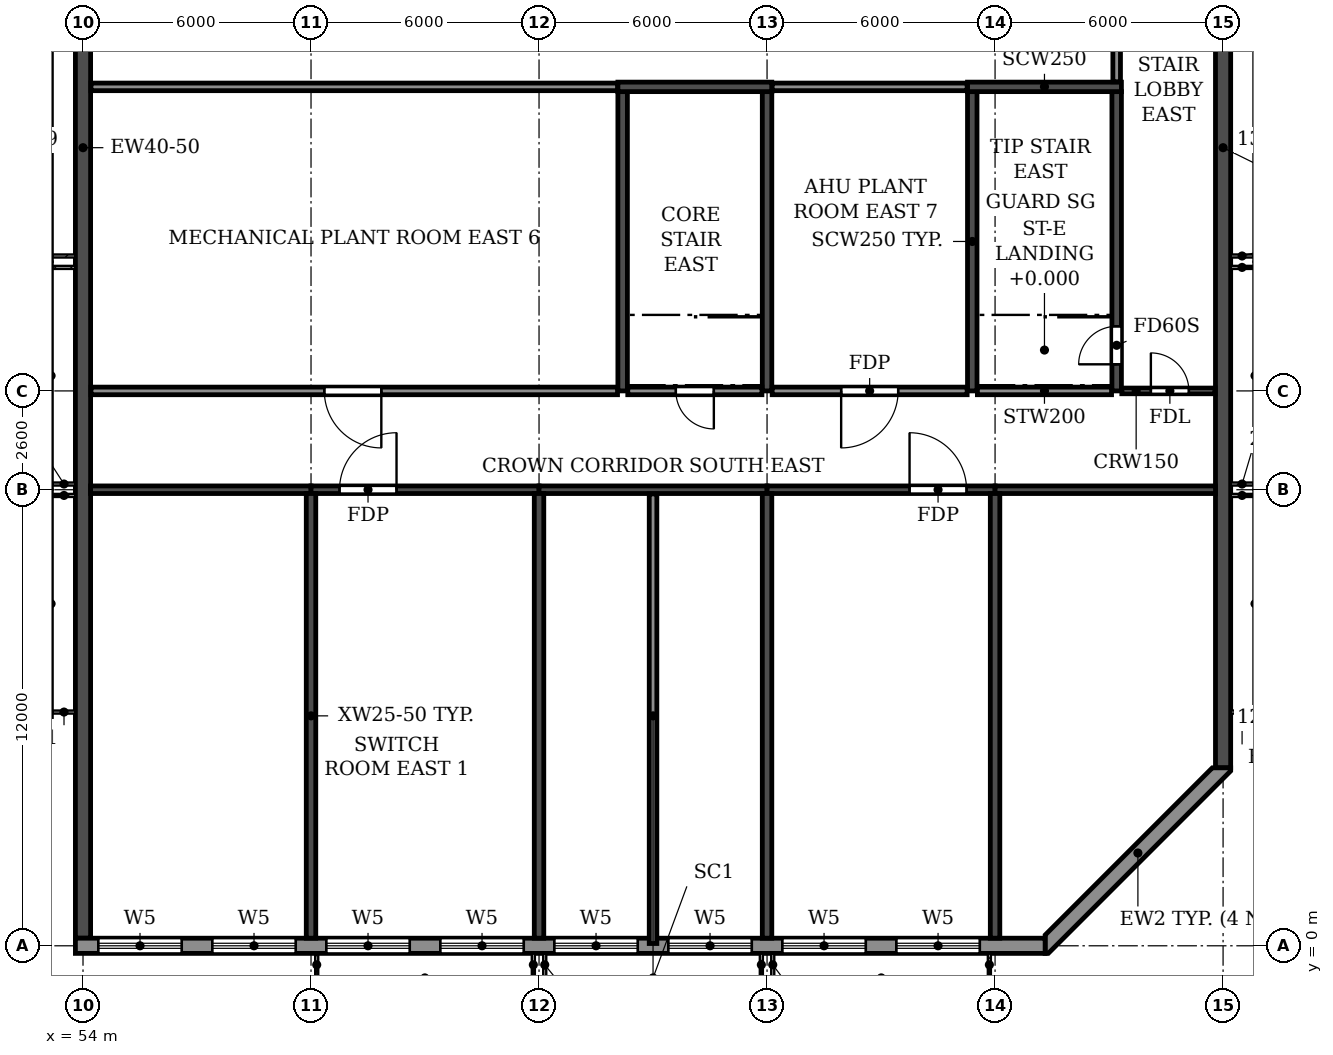
"""IFC4 building model, lengths in metres.
Left out: names, types, materials, properties, quantities, classifications, styles, units other than length and angle.
Written with IfcOpenShell. Run it as: python <this file> out.ifc"""

import sys

from ifc_helpers import new_model, si_unit, direction, frame, frame_2d, origin, place, context, subcontext, project, spatial, polyline, rectangle, outline, extrude, element, fill, save


model = new_model("IFC4")
c1 = context("Model", 3, precision=1e-05, world=origin(), true_north=direction((0.0, 1.0)))
c2 = subcontext(c1, "Body", "Model", "MODEL_VIEW")
j1 = project(units=[si_unit("LENGTHUNIT", "METRE"), si_unit("PLANEANGLEUNIT", "RADIAN")], contexts=[c1])
p1 = place(None, origin())
s1 = spatial("IfcSite", under=j1, at=p1, CompositionType="ELEMENT")
p2 = place(p1, origin())
s2 = spatial("IfcBuilding", under=s1, at=p2, CompositionType="ELEMENT")
p3 = place(p2, frame((0.0, 0.0, 282.3)))
s3 = spatial("IfcBuildingStorey", under=s2, at=p3, CompositionType="ELEMENT", Elevation=282.3)
for number, where, z_axis, x_axis in (
    (1, (60.0, 0.2, 0.0), (0.0, 0.0, 1.0), (0.0, 1.0, 0.0)),
    (2, (66.0, 0.2, 0.0), (0.0, 0.0, 1.0), (0.0, 1.0, 0.0)),
    (3, (72.0, 0.2, 0.0), (0.0, 0.0, 1.0), (0.0, 1.0, 0.0)),
    (4, (78.0, 0.2, 0.0), (0.0, 0.0, 1.0), (0.0, 1.0, 0.0)),
):
    element("IfcWall", number, at=place(p3, frame(where, z_axis=z_axis, x_axis=x_axis)), inside=s3, PredefinedType="SHEAR", context=c2, shape_type="SweptSolid", body=[
        extrude(rectangle(XDim=11.7, YDim=0.25, at=frame_2d((5.85, 0.0))), origin(), (0.0, 0.0, 1.0), 3.05),
    ])
p4 = place(p3, frame((54.0, 0.2, 0.0), z_axis=(0.0, 0.0, 1.0), x_axis=(0.0, 1.0, 0.0)))
e5 = element("IfcWall", 5, at=p4, inside=s3, PredefinedType="SHEAR", context=c2, shape_type="SweptSolid", body=[
    extrude(rectangle(XDim=40.8, YDim=0.4, at=frame_2d((20.4, 0.0))), origin(), (0.0, 0.0, 1.0), 3.05),
])
p5 = place(p3, frame((84.0, 4.683, 0.0), z_axis=(0.0, 0.0, 1.0), x_axis=(0.0, 1.0, 0.0)))
e6 = element("IfcWall", 6, at=p5, inside=s3, PredefinedType="SHEAR", context=c2, shape_type="SweptSolid", body=[
    extrude(rectangle(XDim=31.834, YDim=0.4, at=frame_2d((15.917, 0.0))), origin(), (0.0, 0.0, 1.0), 3.05),
])
p6 = place(p3, frame((54.2, 12.0, 0.0), z_axis=(0.0, 0.0, 1.0), x_axis=(1.0, 0.0, 0.0)))
e7 = element("IfcWall", 7, at=p6, inside=s3, PredefinedType="SHEAR", context=c2, shape_type="SweptSolid", body=[
    extrude(rectangle(XDim=5.8, YDim=0.2, at=frame_2d((2.9, 0.0))), origin(), (0.0, 0.0, 1.0), 2.45),
])
p7 = place(p3, frame((60.0, 12.0, 0.0), z_axis=(0.0, 0.0, 1.0), x_axis=(1.0, 0.0, 0.0)))
e8 = element("IfcWall", 8, at=p7, inside=s3, PredefinedType="SHEAR", context=c2, shape_type="SweptSolid", body=[
    extrude(rectangle(XDim=6.0, YDim=0.2, at=frame_2d((3.0, 0.0))), origin(), (0.0, 0.0, 1.0), 2.45),
])
p8 = place(p7, frame((0.75, 0.0, 0.0)))
e9 = element("IfcOpeningElement", 9, at=p8, cuts=e8, PredefinedType="OPENING", context=c2, shape_type="SweptSolid", body=[
    extrude(rectangle(XDim=1.5, YDim=2.1, at=frame_2d((0.75, 1.05))), frame((0.0, 0.11, 0.0), z_axis=(0.0, -1.0, 0.0), x_axis=(1.0, 0.0, 0.0)), (0.0, 0.0, 1.0), 0.22),
])
p9 = place(p3, frame((66.0, 12.0, 0.0), z_axis=(0.0, 0.0, 1.0), x_axis=(1.0, 0.0, 0.0)))
e10 = element("IfcWall", 10, at=p9, inside=s3, PredefinedType="SHEAR", context=c2, shape_type="SweptSolid", body=[
    extrude(rectangle(XDim=6.0, YDim=0.2, at=frame_2d((3.0, 0.0))), origin(), (0.0, 0.0, 1.0), 2.45),
])
p10 = place(p3, frame((72.0, 12.0, 0.0), z_axis=(0.0, 0.0, 1.0), x_axis=(1.0, 0.0, 0.0)))
e11 = element("IfcWall", 11, at=p10, inside=s3, PredefinedType="SHEAR", context=c2, shape_type="SweptSolid", body=[
    extrude(rectangle(XDim=6.0, YDim=0.2, at=frame_2d((3.0, 0.0))), origin(), (0.0, 0.0, 1.0), 2.45),
])
p11 = place(p10, frame((3.75, 0.0, 0.0)))
e12 = element("IfcOpeningElement", 12, at=p11, cuts=e11, PredefinedType="OPENING", context=c2, shape_type="SweptSolid", body=[
    extrude(rectangle(XDim=1.5, YDim=2.1, at=frame_2d((0.75, 1.05))), frame((0.0, 0.11, 0.0), z_axis=(0.0, -1.0, 0.0), x_axis=(1.0, 0.0, 0.0)), (0.0, 0.0, 1.0), 0.22),
])
p12 = place(p3, frame((78.0, 12.0, 0.0), z_axis=(0.0, 0.0, 1.0), x_axis=(1.0, 0.0, 0.0)))
e13 = element("IfcWall", 13, at=p12, inside=s3, PredefinedType="SHEAR", context=c2, shape_type="SweptSolid", body=[
    extrude(rectangle(XDim=5.8, YDim=0.2, at=frame_2d((2.9, 0.0))), origin(), (0.0, 0.0, 1.0), 2.45),
])
p13 = place(p3, frame((77.4, 14.6, 0.0), z_axis=(0.0, 0.0, 1.0), x_axis=(0.0, 1.0, 0.0)))
e14 = element("IfcWall", 14, at=p13, inside=s3, PredefinedType="SOLIDWALL", context=c2, shape_type="SweptSolid", body=[
    extrude(rectangle(XDim=7.875, YDim=0.25, at=frame_2d((3.938, 0.0))), origin(), (0.0, 0.0, 1.0), 3.05),
])
p14 = place(p3, frame((81.2, 14.6, 0.0), z_axis=(0.0, 0.0, 1.0), x_axis=(0.0, 1.0, 0.0)))
e15 = element("IfcWall", 15, at=p14, inside=s3, PredefinedType="SOLIDWALL", context=c2, shape_type="SweptSolid", body=[
    extrude(rectangle(XDim=7.875, YDim=0.25, at=frame_2d((3.938, 0.0))), origin(), (0.0, 0.0, 1.0), 3.05),
])
p15 = place(p14, frame((0.7, 0.0, 0.0)))
e16 = element("IfcOpeningElement", 16, at=p15, cuts=e15, PredefinedType="OPENING", context=c2, shape_type="SweptSolid", body=[
    extrude(rectangle(XDim=1.0, YDim=2.1, at=frame_2d((0.5, 1.05))), frame((0.0, 0.135, 0.0), z_axis=(0.0, -1.0, 0.0), x_axis=(1.0, 0.0, 0.0)), (0.0, 0.0, 1.0), 0.27),
])
p16 = place(p3, frame((77.275, 22.6, 0.0), z_axis=(0.0, 0.0, 1.0), x_axis=(1.0, 0.0, 0.0)))
e17 = element("IfcWall", 17, at=p16, inside=s3, PredefinedType="SOLIDWALL", context=c2, shape_type="SweptSolid", body=[
    extrude(rectangle(XDim=4.05, YDim=0.25, at=frame_2d((2.025, 0.0))), origin(), (0.0, 0.0, 1.0), 3.05),
])
for number, where, z_axis, x_axis in (
    (18, (68.2, 14.6, 0.0), (0.0, 0.0, 1.0), (0.0, 1.0, 0.0)),
    (19, (72.0, 14.6, 0.0), (0.0, 0.0, 1.0), (0.0, 1.0, 0.0)),
):
    element("IfcWall", number, at=place(p3, frame(where, z_axis=z_axis, x_axis=x_axis)), inside=s3, PredefinedType="SOLIDWALL", context=c2, shape_type="SweptSolid", body=[
        extrude(rectangle(XDim=7.875, YDim=0.25, at=frame_2d((3.938, 0.0))), origin(), (0.0, 0.0, 1.0), 3.05),
    ])
p17 = place(p3, frame((68.075, 22.6, 0.0), z_axis=(0.0, 0.0, 1.0), x_axis=(1.0, 0.0, 0.0)))
e20 = element("IfcWall", 20, at=p17, inside=s3, PredefinedType="SOLIDWALL", context=c2, shape_type="SweptSolid", body=[
    extrude(rectangle(XDim=4.05, YDim=0.25, at=frame_2d((2.025, 0.0))), origin(), (0.0, 0.0, 1.0), 3.05),
])
p18 = place(p3, frame((53.8, 0.0, 0.0), z_axis=(0.0, 0.0, 1.0), x_axis=(1.0, 0.0, 0.0)))
e21 = element("IfcWall", 21, at=p18, inside=s3, PredefinedType="STANDARD", context=c2, shape_type="SweptSolid", body=[
    extrude(rectangle(XDim=25.517, YDim=0.4, at=frame_2d((12.759, 0.0))), origin(), (0.0, 0.0, 1.0), 3.05),
])
p19 = place(p18, frame((0.6, 0.0, 0.6)))
e22 = element("IfcOpeningElement", 22, at=p19, cuts=e21, PredefinedType="OPENING", context=c2, shape_type="SweptSolid", body=[
    extrude(rectangle(XDim=2.2, YDim=2.4, at=frame_2d((1.1, 1.2))), frame((0.0, 0.21, 0.0), z_axis=(0.0, -1.0, 0.0), x_axis=(1.0, 0.0, 0.0)), (0.0, 0.0, 1.0), 0.42),
])
p20 = place(p18, frame((3.6, 0.0, 0.6)))
e23 = element("IfcOpeningElement", 23, at=p20, cuts=e21, PredefinedType="OPENING", context=c2, shape_type="SweptSolid", body=[
    extrude(rectangle(XDim=2.2, YDim=2.4, at=frame_2d((1.1, 1.2))), frame((0.0, 0.21, 0.0), z_axis=(0.0, -1.0, 0.0), x_axis=(1.0, 0.0, 0.0)), (0.0, 0.0, 1.0), 0.42),
])
p21 = place(p18, frame((6.6, 0.0, 0.6)))
e24 = element("IfcOpeningElement", 24, at=p21, cuts=e21, PredefinedType="OPENING", context=c2, shape_type="SweptSolid", body=[
    extrude(rectangle(XDim=2.2, YDim=2.4, at=frame_2d((1.1, 1.2))), frame((0.0, 0.21, 0.0), z_axis=(0.0, -1.0, 0.0), x_axis=(1.0, 0.0, 0.0)), (0.0, 0.0, 1.0), 0.42),
])
p22 = place(p18, frame((9.6, 0.0, 0.6)))
e25 = element("IfcOpeningElement", 25, at=p22, cuts=e21, PredefinedType="OPENING", context=c2, shape_type="SweptSolid", body=[
    extrude(rectangle(XDim=2.2, YDim=2.4, at=frame_2d((1.1, 1.2))), frame((0.0, 0.21, 0.0), z_axis=(0.0, -1.0, 0.0), x_axis=(1.0, 0.0, 0.0)), (0.0, 0.0, 1.0), 0.42),
])
p23 = place(p18, frame((12.6, 0.0, 0.6)))
e26 = element("IfcOpeningElement", 26, at=p23, cuts=e21, PredefinedType="OPENING", context=c2, shape_type="SweptSolid", body=[
    extrude(rectangle(XDim=2.2, YDim=2.4, at=frame_2d((1.1, 1.2))), frame((0.0, 0.21, 0.0), z_axis=(0.0, -1.0, 0.0), x_axis=(1.0, 0.0, 0.0)), (0.0, 0.0, 1.0), 0.42),
])
p24 = place(p18, frame((15.6, 0.0, 0.6)))
e27 = element("IfcOpeningElement", 27, at=p24, cuts=e21, PredefinedType="OPENING", context=c2, shape_type="SweptSolid", body=[
    extrude(rectangle(XDim=2.2, YDim=2.4, at=frame_2d((1.1, 1.2))), frame((0.0, 0.21, 0.0), z_axis=(0.0, -1.0, 0.0), x_axis=(1.0, 0.0, 0.0)), (0.0, 0.0, 1.0), 0.42),
])
p25 = place(p18, frame((18.6, 0.0, 0.6)))
e28 = element("IfcOpeningElement", 28, at=p25, cuts=e21, PredefinedType="OPENING", context=c2, shape_type="SweptSolid", body=[
    extrude(rectangle(XDim=2.2, YDim=2.4, at=frame_2d((1.1, 1.2))), frame((0.0, 0.21, 0.0), z_axis=(0.0, -1.0, 0.0), x_axis=(1.0, 0.0, 0.0)), (0.0, 0.0, 1.0), 0.42),
])
p26 = place(p18, frame((21.6, 0.0, 0.6)))
e29 = element("IfcOpeningElement", 29, at=p26, cuts=e21, PredefinedType="OPENING", context=c2, shape_type="SweptSolid", body=[
    extrude(rectangle(XDim=2.2, YDim=2.4, at=frame_2d((1.1, 1.2))), frame((0.0, 0.21, 0.0), z_axis=(0.0, -1.0, 0.0), x_axis=(1.0, 0.0, 0.0)), (0.0, 0.0, 1.0), 0.42),
])
p27 = place(p3, origin())
e30 = element("IfcWall", 30, at=p27, inside=s3, PredefinedType="STANDARD", context=c2, shape_type="SweptSolid", body=[
    extrude(outline(polyline([(79.317, -0.2), (79.4, -0.2), (84.2, 4.6), (84.2, 4.683), (83.717, 4.683), (79.317, 0.283), (79.317, -0.2)])), origin(), (0.0, 0.0, 1.0), 3.05),
])
p28 = place(p3, frame((81.335, 14.6, 0.0), z_axis=(0.0, 0.0, 1.0), x_axis=(1.0, 0.0, 0.0)))
e31 = element("IfcWall", 31, at=p28, inside=s3, PredefinedType="PARTITIONING", context=c2, shape_type="SweptSolid", body=[
    extrude(rectangle(XDim=2.455, YDim=0.15, at=frame_2d((1.228, 0.0))), origin(), (0.0, 0.0, 1.0), 3.05),
])
p29 = place(p28, frame((0.765, 0.0, 0.0)))
e32 = element("IfcOpeningElement", 32, at=p29, cuts=e31, PredefinedType="OPENING", context=c2, shape_type="SweptSolid", body=[
    extrude(rectangle(XDim=1.0, YDim=2.1, at=frame_2d((0.5, 1.05))), frame((0.0, 0.085, 0.0), z_axis=(0.0, -1.0, 0.0), x_axis=(1.0, 0.0, 0.0)), (0.0, 0.0, 1.0), 0.17),
])
p30 = place(p3, frame((54.21, 14.6, 0.0), z_axis=(0.0, 0.0, 1.0), x_axis=(1.0, 0.0, 0.0)))
e33 = element("IfcWall", 33, at=p30, inside=s3, PredefinedType="PARTITIONING", context=c2, shape_type="SweptSolid", body=[
    extrude(rectangle(XDim=13.855, YDim=0.2, at=frame_2d((6.927, 0.0))), origin(), (0.0, 0.0, 1.0), 3.05),
])
p31 = place(p30, frame((6.14, 0.0, 0.0)))
e34 = element("IfcOpeningElement", 34, at=p31, cuts=e33, PredefinedType="OPENING", context=c2, shape_type="SweptSolid", body=[
    extrude(rectangle(XDim=1.5, YDim=2.1, at=frame_2d((0.75, 1.05))), frame((0.0, 0.11, 0.0), z_axis=(0.0, -1.0, 0.0), x_axis=(1.0, 0.0, 0.0)), (0.0, 0.0, 1.0), 0.22),
])
p32 = place(p3, frame((72.135, 14.6, 0.0), z_axis=(0.0, 0.0, 1.0), x_axis=(1.0, 0.0, 0.0)))
e35 = element("IfcWall", 35, at=p32, inside=s3, PredefinedType="PARTITIONING", context=c2, shape_type="SweptSolid", body=[
    extrude(rectangle(XDim=5.13, YDim=0.2, at=frame_2d((2.565, 0.0))), origin(), (0.0, 0.0, 1.0), 3.05),
])
p33 = place(p32, frame((1.815, 0.0, 0.0)))
e36 = element("IfcOpeningElement", 36, at=p33, cuts=e35, PredefinedType="OPENING", context=c2, shape_type="SweptSolid", body=[
    extrude(rectangle(XDim=1.5, YDim=2.1, at=frame_2d((0.75, 1.05))), frame((0.0, 0.11, 0.0), z_axis=(0.0, -1.0, 0.0), x_axis=(1.0, 0.0, 0.0)), (0.0, 0.0, 1.0), 0.22),
])
p34 = place(p3, frame((54.21, 22.6, 0.0), z_axis=(0.0, 0.0, 1.0), x_axis=(1.0, 0.0, 0.0)))
e37 = element("IfcWall", 37, at=p34, inside=s3, PredefinedType="PARTITIONING", context=c2, shape_type="SweptSolid", body=[
    extrude(rectangle(XDim=13.855, YDim=0.2, at=frame_2d((6.927, 0.0))), origin(), (0.0, 0.0, 1.0), 3.05),
])
p35 = place(p3, frame((72.135, 22.6, 0.0), z_axis=(0.0, 0.0, 1.0), x_axis=(1.0, 0.0, 0.0)))
e38 = element("IfcWall", 38, at=p35, inside=s3, PredefinedType="PARTITIONING", context=c2, shape_type="SweptSolid", body=[
    extrude(rectangle(XDim=5.13, YDim=0.2, at=frame_2d((2.565, 0.0))), origin(), (0.0, 0.0, 1.0), 3.05),
])
p36 = place(p3, frame((69.0, 0.06, 0.0), z_axis=(0.0, 0.0, 1.0), x_axis=(0.0, 1.0, 0.0)))
e39 = element("IfcWall", 39, at=p36, inside=s3, PredefinedType="PARTITIONING", context=c2, shape_type="SweptSolid", body=[
    extrude(rectangle(XDim=11.83, YDim=0.2, at=frame_2d((5.915, 0.0))), origin(), (0.0, 0.0, 1.0), 3.05),
])
p37 = place(p3, frame((81.2, 22.735, 0.0), z_axis=(0.0, 0.0, 1.0), x_axis=(0.0, 1.0, 0.0)))
e40 = element("IfcWall", 40, at=p37, inside=s3, PredefinedType="PARTITIONING", context=c2, shape_type="SweptSolid", body=[
    extrude(rectangle(XDim=4.965, YDim=0.2, at=frame_2d((2.482, 0.0))), origin(), (0.0, 0.0, 1.0), 3.05),
])
p38 = place(p3, frame((68.335, 14.6, 0.0), z_axis=(0.0, 0.0, 1.0), x_axis=(1.0, 0.0, 0.0)))
e41 = element("IfcWall", 41, at=p38, inside=s3, PredefinedType="PARTITIONING", context=c2, shape_type="SweptSolid", body=[
    extrude(rectangle(XDim=3.53, YDim=0.2, at=frame_2d((1.765, 0.0))), origin(), (0.0, 0.0, 1.0), 3.05),
])
p39 = place(p38, frame((1.265, 0.0, 0.0)))
e42 = element("IfcOpeningElement", 42, at=p39, cuts=e41, PredefinedType="OPENING", context=c2, shape_type="SweptSolid", body=[
    extrude(rectangle(XDim=1.0, YDim=2.1, at=frame_2d((0.5, 1.05))), frame((0.0, 0.11, 0.0), z_axis=(0.0, -1.0, 0.0), x_axis=(1.0, 0.0, 0.0)), (0.0, 0.0, 1.0), 0.22),
])
p40 = place(p3, frame((77.535, 14.6, 0.0), z_axis=(0.0, 0.0, 1.0), x_axis=(1.0, 0.0, 0.0)))
e43 = element("IfcWall", 43, at=p40, inside=s3, PredefinedType="PARTITIONING", context=c2, shape_type="SweptSolid", body=[
    extrude(rectangle(XDim=3.53, YDim=0.2, at=frame_2d((1.765, 0.0))), origin(), (0.0, 0.0, 1.0), 3.05),
])
p41 = place(p19, origin())
e44 = element("IfcWindow", 44, at=p41, inside=s3, PartitioningType="TRIPLE_PANEL_HORIZONTAL", PredefinedType="WINDOW", context=c2, shape_type="SweptSolid", body=[
    extrude(rectangle(XDim=2.2, YDim=2.4, at=frame_2d((1.1, 1.2))), frame((0.0, 0.03, 0.0), z_axis=(0.0, -1.0, 0.0), x_axis=(1.0, 0.0, 0.0)), (0.0, 0.0, 1.0), 0.06),
])
fill(e22, e44)
p42 = place(p20, origin())
e45 = element("IfcWindow", 45, at=p42, inside=s3, PartitioningType="TRIPLE_PANEL_HORIZONTAL", PredefinedType="WINDOW", context=c2, shape_type="SweptSolid", body=[
    extrude(rectangle(XDim=2.2, YDim=2.4, at=frame_2d((1.1, 1.2))), frame((0.0, 0.03, 0.0), z_axis=(0.0, -1.0, 0.0), x_axis=(1.0, 0.0, 0.0)), (0.0, 0.0, 1.0), 0.06),
])
fill(e23, e45)
p43 = place(p21, origin())
e46 = element("IfcWindow", 46, at=p43, inside=s3, PartitioningType="TRIPLE_PANEL_HORIZONTAL", PredefinedType="WINDOW", context=c2, shape_type="SweptSolid", body=[
    extrude(rectangle(XDim=2.2, YDim=2.4, at=frame_2d((1.1, 1.2))), frame((0.0, 0.03, 0.0), z_axis=(0.0, -1.0, 0.0), x_axis=(1.0, 0.0, 0.0)), (0.0, 0.0, 1.0), 0.06),
])
fill(e24, e46)
p44 = place(p22, origin())
e47 = element("IfcWindow", 47, at=p44, inside=s3, PartitioningType="TRIPLE_PANEL_HORIZONTAL", PredefinedType="WINDOW", context=c2, shape_type="SweptSolid", body=[
    extrude(rectangle(XDim=2.2, YDim=2.4, at=frame_2d((1.1, 1.2))), frame((0.0, 0.03, 0.0), z_axis=(0.0, -1.0, 0.0), x_axis=(1.0, 0.0, 0.0)), (0.0, 0.0, 1.0), 0.06),
])
fill(e25, e47)
p45 = place(p23, origin())
e48 = element("IfcWindow", 48, at=p45, inside=s3, PartitioningType="TRIPLE_PANEL_HORIZONTAL", PredefinedType="WINDOW", context=c2, shape_type="SweptSolid", body=[
    extrude(rectangle(XDim=2.2, YDim=2.4, at=frame_2d((1.1, 1.2))), frame((0.0, 0.03, 0.0), z_axis=(0.0, -1.0, 0.0), x_axis=(1.0, 0.0, 0.0)), (0.0, 0.0, 1.0), 0.06),
])
fill(e26, e48)
p46 = place(p24, origin())
e49 = element("IfcWindow", 49, at=p46, inside=s3, PartitioningType="TRIPLE_PANEL_HORIZONTAL", PredefinedType="WINDOW", context=c2, shape_type="SweptSolid", body=[
    extrude(rectangle(XDim=2.2, YDim=2.4, at=frame_2d((1.1, 1.2))), frame((0.0, 0.03, 0.0), z_axis=(0.0, -1.0, 0.0), x_axis=(1.0, 0.0, 0.0)), (0.0, 0.0, 1.0), 0.06),
])
fill(e27, e49)
p47 = place(p25, origin())
e50 = element("IfcWindow", 50, at=p47, inside=s3, PartitioningType="TRIPLE_PANEL_HORIZONTAL", PredefinedType="WINDOW", context=c2, shape_type="SweptSolid", body=[
    extrude(rectangle(XDim=2.2, YDim=2.4, at=frame_2d((1.1, 1.2))), frame((0.0, 0.03, 0.0), z_axis=(0.0, -1.0, 0.0), x_axis=(1.0, 0.0, 0.0)), (0.0, 0.0, 1.0), 0.06),
])
fill(e28, e50)
p48 = place(p26, origin())
e51 = element("IfcWindow", 51, at=p48, inside=s3, PartitioningType="TRIPLE_PANEL_HORIZONTAL", PredefinedType="WINDOW", context=c2, shape_type="SweptSolid", body=[
    extrude(rectangle(XDim=2.2, YDim=2.4, at=frame_2d((1.1, 1.2))), frame((0.0, 0.03, 0.0), z_axis=(0.0, -1.0, 0.0), x_axis=(1.0, 0.0, 0.0)), (0.0, 0.0, 1.0), 0.06),
])
fill(e29, e51)
p49 = place(p31, frame((1.5, 0.0, 0.0), z_axis=(0.0, 0.0, 1.0), x_axis=(-1.0, 0.0, 0.0)))
e52 = element("IfcDoor", 52, at=p49, inside=s3, OperationType="DOUBLE_DOOR_SINGLE_SWING", PredefinedType="DOOR", context=c2, shape_type="SweptSolid", body=[
    extrude(rectangle(XDim=1.5, YDim=2.1, at=frame_2d((0.75, 1.05))), frame((0.0, 0.025, 0.0), z_axis=(0.0, -1.0, 0.0), x_axis=(1.0, 0.0, 0.0)), (0.0, 0.0, 1.0), 0.05),
])
fill(e34, e52)
p50 = place(p8, origin())
e53 = element("IfcDoor", 53, at=p50, inside=s3, OperationType="DOUBLE_DOOR_SINGLE_SWING", PredefinedType="DOOR", context=c2, shape_type="SweptSolid", body=[
    extrude(rectangle(XDim=1.5, YDim=2.1, at=frame_2d((0.75, 1.05))), frame((0.0, 0.025, 0.0), z_axis=(0.0, -1.0, 0.0), x_axis=(1.0, 0.0, 0.0)), (0.0, 0.0, 1.0), 0.05),
])
fill(e9, e53)
p51 = place(p33, frame((1.5, 0.0, 0.0), z_axis=(0.0, 0.0, 1.0), x_axis=(-1.0, 0.0, 0.0)))
e54 = element("IfcDoor", 54, at=p51, inside=s3, OperationType="DOUBLE_DOOR_SINGLE_SWING", PredefinedType="DOOR", context=c2, shape_type="SweptSolid", body=[
    extrude(rectangle(XDim=1.5, YDim=2.1, at=frame_2d((0.75, 1.05))), frame((0.0, 0.025, 0.0), z_axis=(0.0, -1.0, 0.0), x_axis=(1.0, 0.0, 0.0)), (0.0, 0.0, 1.0), 0.05),
])
fill(e36, e54)
p52 = place(p11, origin())
e55 = element("IfcDoor", 55, at=p52, inside=s3, OperationType="DOUBLE_DOOR_SINGLE_SWING", PredefinedType="DOOR", context=c2, shape_type="SweptSolid", body=[
    extrude(rectangle(XDim=1.5, YDim=2.1, at=frame_2d((0.75, 1.05))), frame((0.0, 0.025, 0.0), z_axis=(0.0, -1.0, 0.0), x_axis=(1.0, 0.0, 0.0)), (0.0, 0.0, 1.0), 0.05),
])
fill(e12, e55)
p53 = place(p15, origin())
e56 = element("IfcDoor", 56, at=p53, inside=s3, OperationType="SINGLE_SWING_LEFT", PredefinedType="DOOR", context=c2, shape_type="SweptSolid", body=[
    extrude(rectangle(XDim=1.0, YDim=2.1, at=frame_2d((0.5, 1.05))), frame((0.0, 0.025, 0.0), z_axis=(0.0, -1.0, 0.0), x_axis=(1.0, 0.0, 0.0)), (0.0, 0.0, 1.0), 0.05),
])
fill(e16, e56)
p54 = place(p29, origin())
e57 = element("IfcDoor", 57, at=p54, inside=s3, OperationType="SINGLE_SWING_LEFT", PredefinedType="DOOR", context=c2, shape_type="SweptSolid", body=[
    extrude(rectangle(XDim=1.0, YDim=2.1, at=frame_2d((0.5, 1.05))), frame((0.0, 0.025, 0.0), z_axis=(0.0, -1.0, 0.0), x_axis=(1.0, 0.0, 0.0)), (0.0, 0.0, 1.0), 0.05),
])
fill(e32, e57)
p55 = place(p39, frame((1.0, 0.0, 0.0), z_axis=(0.0, 0.0, 1.0), x_axis=(-1.0, 0.0, 0.0)))
e58 = element("IfcDoor", 58, at=p55, inside=s3, OperationType="SINGLE_SWING_LEFT", PredefinedType="DOOR", context=c2, shape_type="SweptSolid", body=[
    extrude(rectangle(XDim=1.0, YDim=2.1, at=frame_2d((0.5, 1.05))), frame((0.0, 0.025, 0.0), z_axis=(0.0, -1.0, 0.0), x_axis=(1.0, 0.0, 0.0)), (0.0, 0.0, 1.0), 0.05),
])
fill(e42, e58)
save(model, sys.argv[1])
